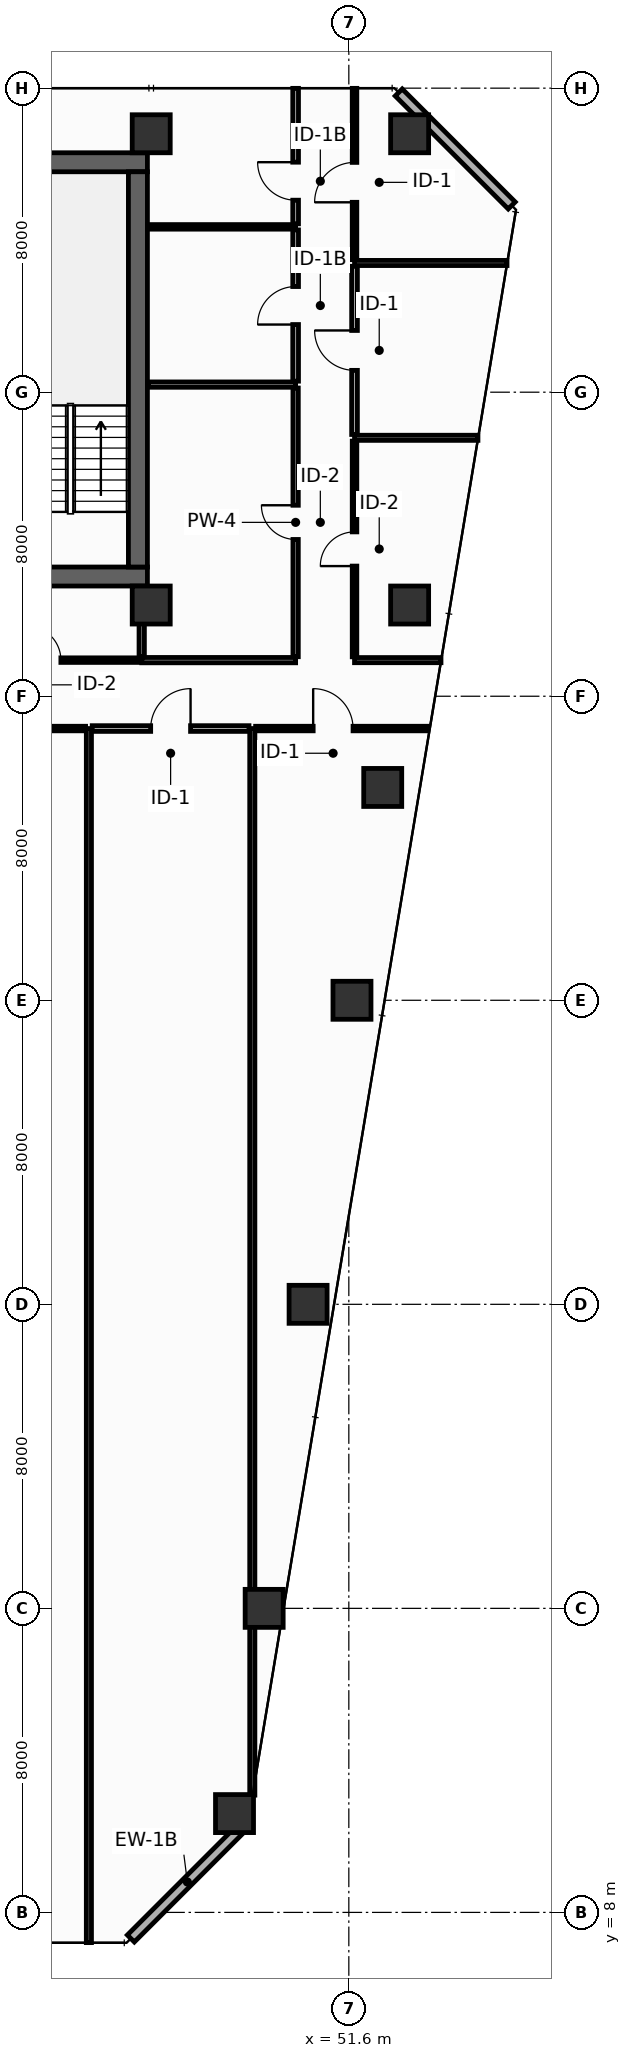
"""IFC4 building model, lengths in metres.
Left out: names, types, materials, properties, quantities, classifications, styles, units other than length and angle.
Written with IfcOpenShell. Run it as: python <this file> out.ifc"""

import sys

from ifc_helpers import new_model, si_unit, direction, frame, frame_2d, origin, origin_2d, place, context, subcontext, project, spatial, rectangle, hollow_rectangle, extrude, element, fill, save


model = new_model("IFC4")
c1 = context("Model", 3, precision=1e-05, world=origin(), true_north=direction((0.0, 1.0)))
c2 = subcontext(c1, "Body", "Model", "MODEL_VIEW")
j1 = project(units=[si_unit("LENGTHUNIT", "METRE"), si_unit("PLANEANGLEUNIT", "RADIAN")], contexts=[c1])
p1 = place(None, origin())
s1 = spatial("IfcSite", under=j1, at=p1, CompositionType="ELEMENT")
p2 = place(p1, origin())
s2 = spatial("IfcBuilding", under=s1, at=p2, CompositionType="ELEMENT")
p3 = place(p2, frame((0.0, 0.0, 141.0)))
s3 = spatial("IfcBuildingStorey", under=s2, at=p3, CompositionType="ELEMENT", Elevation=141.0)
p4 = place(p3, frame((13.6, 43.15, 0.0), z_axis=(0.0, 0.0, 1.0), x_axis=(1.0, 0.0, 0.0)))
e1 = element("IfcWall", 1, at=p4, inside=s3, PredefinedType="SHEAR", context=c2, shape_type="SweptSolid", body=[
    extrude(rectangle(XDim=32.7, YDim=0.5, at=frame_2d((16.35, 0.0))), origin(), (0.0, 0.0, 1.0), 3.55),
])
p5 = place(p4, frame((5.4, 0.0, 0.0)))
e2 = element("IfcOpeningElement", 2, at=p5, cuts=e1, PredefinedType="OPENING", context=c2, shape_type="SweptSolid", body=[
    extrude(rectangle(XDim=1.1, YDim=2.15, at=frame_2d((0.55, 1.075))), frame((0.0, 0.26, 0.0), z_axis=(0.0, -1.0, 0.0), x_axis=(1.0, 0.0, 0.0)), (0.0, 0.0, 1.0), 0.52),
])
p6 = place(p4, frame((25.6, 0.0, 0.0)))
e3 = element("IfcOpeningElement", 3, at=p6, cuts=e1, PredefinedType="OPENING", context=c2, shape_type="SweptSolid", body=[
    extrude(rectangle(XDim=1.1, YDim=2.15, at=frame_2d((0.55, 1.075))), frame((0.0, 0.26, 0.0), z_axis=(0.0, -1.0, 0.0), x_axis=(1.0, 0.0, 0.0)), (0.0, 0.0, 1.0), 0.52),
])
p7 = place(p3, frame((13.6, 54.05, 0.0), z_axis=(0.0, 0.0, 1.0), x_axis=(1.0, 0.0, 0.0)))
e4 = element("IfcWall", 4, at=p7, inside=s3, PredefinedType="SHEAR", context=c2, shape_type="SweptSolid", body=[
    extrude(rectangle(XDim=32.7, YDim=0.5, at=frame_2d((16.35, 0.0))), origin(), (0.0, 0.0, 1.0), 3.55),
])
p8 = place(p3, frame((46.05, 43.4, 0.0), z_axis=(0.0, 0.0, 1.0), x_axis=(0.0, 1.0, 0.0)))
e5 = element("IfcWall", 5, at=p8, inside=s3, PredefinedType="SHEAR", context=c2, shape_type="SweptSolid", body=[
    extrude(rectangle(XDim=10.4, YDim=0.5, at=frame_2d((5.2, 0.0))), origin(), (0.0, 0.0, 1.0), 3.55),
])
for number, where, z_axis, x_axis in (
    (6, (46.4, 54.8, 0.0), (0.0, 0.0, 1.0), (1.0, 0.0, 0.0)),
    (7, (53.2, 54.8, 0.0), (0.0, 0.0, 1.0), (1.0, 0.0, 0.0)),
    (8, (46.4, 42.4, 0.0), (0.0, 0.0, 1.0), (1.0, 0.0, 0.0)),
    (9, (53.2, 42.4, 0.0), (0.0, 0.0, 1.0), (1.0, 0.0, 0.0)),
    (10, (48.592, 10.6, 0.0), (0.0, 0.0, 1.0), (1.0, 0.0, 0.0)),
    (11, (49.372, 16.0, 0.0), (0.0, 0.0, 1.0), (1.0, 0.0, 0.0)),
    (12, (50.528, 24.0, 0.0), (0.0, 0.0, 1.0), (1.0, 0.0, 0.0)),
    (13, (51.683, 32.0, 0.0), (0.0, 0.0, 1.0), (1.0, 0.0, 0.0)),
    (14, (52.492, 37.6, 0.0), (0.0, 0.0, 1.0), (1.0, 0.0, 0.0)),
):
    element("IfcColumn", number, at=place(p3, frame(where, z_axis=z_axis, x_axis=x_axis)), inside=s3, PredefinedType="COLUMN", context=c2, shape_type="SweptSolid", body=[
        extrude(hollow_rectangle(XDim=1.0, YDim=1.0, WallThickness=0.045, at=origin_2d()), origin(), (0.0, 0.0, 1.0), 3.8),
    ])
p9 = place(p3, frame((45.864, 7.313, 0.0), z_axis=(0.0, 0.0, 1.0), x_axis=(0.70707775441, 0.707135806771, 0.0)))
e15 = element("IfcWall", 15, at=p9, inside=s3, PredefinedType="STANDARD", context=c2, shape_type="SweptSolid", body=[
    extrude(rectangle(XDim=4.206, YDim=0.26, at=frame_2d((2.103, 0.0))), origin(), (0.0, 0.0, 1.0), 3.55),
])
p10 = place(p3, frame((55.887, 52.913, 0.0), z_axis=(0.0, 0.0, 1.0), x_axis=(-0.707106781187, 0.707106781187, 0.0)))
e16 = element("IfcWall", 16, at=p10, inside=s3, PredefinedType="STANDARD", context=c2, shape_type="SweptSolid", body=[
    extrude(rectangle(XDim=4.206, YDim=0.26, at=frame_2d((2.103, 0.0))), origin(), (0.0, 0.0, 1.0), 3.55),
])
p11 = place(p3, frame((46.15, 40.95, 0.0), z_axis=(0.0, 0.0, 1.0), x_axis=(1.0, 0.0, 0.0)))
e17 = element("IfcWall", 17, at=p11, inside=s3, PredefinedType="PARTITIONING", context=c2, shape_type="SweptSolid", body=[
    extrude(rectangle(XDim=4.05, YDim=0.14, at=frame_2d((2.025, 0.0))), origin(), (0.0, 0.0, 1.0), 3.55),
])
p12 = place(p3, frame((46.15, 41.04, 0.0), z_axis=(0.0, 0.0, 1.0), x_axis=(0.0, 1.0, 0.0)))
e18 = element("IfcWall", 18, at=p12, inside=s3, PredefinedType="PARTITIONING", context=c2, shape_type="SweptSolid", body=[
    extrude(rectangle(XDim=1.84, YDim=0.14, at=frame_2d((0.92, 0.0))), origin(), (0.0, 0.0, 1.0), 3.55),
])
p13 = place(p3, frame((46.32, 48.2, 0.0), z_axis=(0.0, 0.0, 1.0), x_axis=(1.0, 0.0, 0.0)))
e19 = element("IfcWall", 19, at=p13, inside=s3, PredefinedType="PARTITIONING", context=c2, shape_type="SweptSolid", body=[
    extrude(rectangle(XDim=3.88, YDim=0.14, at=frame_2d((1.94, 0.0))), origin(), (0.0, 0.0, 1.0), 3.55),
])
p14 = place(p3, frame((50.2, 41.04, 0.0), z_axis=(0.0, 0.0, 1.0), x_axis=(0.0, 1.0, 0.0)))
e20 = element("IfcWall", 20, at=p14, inside=s3, PredefinedType="PARTITIONING", context=c2, shape_type="SweptSolid", body=[
    extrude(rectangle(XDim=7.07, YDim=0.14, at=frame_2d((3.535, 0.0))), origin(), (0.0, 0.0, 1.0), 2.835),
])
p15 = place(p14, frame((3.085, 0.0, 0.0)))
e21 = element("IfcOpeningElement", 21, at=p15, cuts=e20, PredefinedType="OPENING", context=c2, shape_type="SweptSolid", body=[
    extrude(rectangle(XDim=0.9, YDim=2.1, at=frame_2d((0.45, 1.05))), frame((0.0, 0.08, 0.0), z_axis=(0.0, -1.0, 0.0), x_axis=(1.0, 0.0, 0.0)), (0.0, 0.0, 1.0), 0.16),
])
p16 = place(p3, frame((46.32, 52.35, 0.0), z_axis=(0.0, 0.0, 1.0), x_axis=(1.0, 0.0, 0.0)))
e22 = element("IfcWall", 22, at=p16, inside=s3, PredefinedType="PARTITIONING", context=c2, shape_type="SweptSolid", body=[
    extrude(rectangle(XDim=3.88, YDim=0.12, at=frame_2d((1.94, 0.0))), origin(), (0.0, 0.0, 1.0), 3.55),
])
p17 = place(p3, frame((50.2, 48.29, 0.0), z_axis=(0.0, 0.0, 1.0), x_axis=(0.0, 1.0, 0.0)))
e23 = element("IfcWall", 23, at=p17, inside=s3, PredefinedType="PARTITIONING", context=c2, shape_type="SweptSolid", body=[
    extrude(rectangle(XDim=3.98, YDim=0.15, at=frame_2d((1.99, 0.0))), origin(), (0.0, 0.0, 1.0), 3.55),
])
p18 = place(p17, frame((1.49, 0.0, 0.0)))
e24 = element("IfcOpeningElement", 24, at=p18, cuts=e23, PredefinedType="OPENING", context=c2, shape_type="SweptSolid", body=[
    extrude(rectangle(XDim=1.0, YDim=2.15, at=frame_2d((0.5, 1.075))), frame((0.0, 0.085, 0.0), z_axis=(0.0, -1.0, 0.0), x_axis=(1.0, 0.0, 0.0)), (0.0, 0.0, 1.0), 0.17),
])
p19 = place(p3, frame((50.2, 52.43, 0.0), z_axis=(0.0, 0.0, 1.0), x_axis=(0.0, 1.0, 0.0)))
e25 = element("IfcWall", 25, at=p19, inside=s3, PredefinedType="PARTITIONING", context=c2, shape_type="SweptSolid", body=[
    extrude(rectangle(XDim=3.565, YDim=0.15, at=frame_2d((1.783, 0.0))), origin(), (0.0, 0.0, 1.0), 2.935),
])
p20 = place(p19, frame((0.622, 0.0, 0.0)))
e26 = element("IfcOpeningElement", 26, at=p20, cuts=e25, PredefinedType="OPENING", context=c2, shape_type="SweptSolid", body=[
    extrude(rectangle(XDim=1.0, YDim=2.15, at=frame_2d((0.5, 1.075))), frame((0.0, 0.085, 0.0), z_axis=(0.0, -1.0, 0.0), x_axis=(1.0, 0.0, 0.0)), (0.0, 0.0, 1.0), 0.17),
])
p21 = place(p3, frame((51.75, 40.95, 0.0), z_axis=(0.0, 0.0, 1.0), x_axis=(1.0, 0.0, 0.0)))
e27 = element("IfcWall", 27, at=p21, inside=s3, PredefinedType="PARTITIONING", context=c2, shape_type="SweptSolid", body=[
    extrude(rectangle(XDim=2.275, YDim=0.135, at=frame_2d((1.137, 0.0))), origin(), (0.0, 0.0, 1.0), 3.035),
])
p22 = place(p3, frame((51.75, 46.8, 0.0), z_axis=(0.0, 0.0, 1.0), x_axis=(1.0, 0.0, 0.0)))
e28 = element("IfcWall", 28, at=p22, inside=s3, PredefinedType="PARTITIONING", context=c2, shape_type="SweptSolid", body=[
    extrude(rectangle(XDim=3.247, YDim=0.135, at=frame_2d((1.624, 0.0))), origin(), (0.0, 0.0, 1.0), 2.835),
])
p23 = place(p3, frame((51.75, 51.4, 0.0), z_axis=(0.0, 0.0, 1.0), x_axis=(1.0, 0.0, 0.0)))
e29 = element("IfcWall", 29, at=p23, inside=s3, PredefinedType="PARTITIONING", context=c2, shape_type="SweptSolid", body=[
    extrude(rectangle(XDim=4.012, YDim=0.135, at=frame_2d((2.006, 0.0))), origin(), (0.0, 0.0, 1.0), 2.835),
])
p24 = place(p3, frame((51.75, 41.038, 0.0), z_axis=(0.0, 0.0, 1.0), x_axis=(0.0, 1.0, 0.0)))
e30 = element("IfcWall", 30, at=p24, inside=s3, PredefinedType="PARTITIONING", context=c2, shape_type="SweptSolid", body=[
    extrude(rectangle(XDim=5.675, YDim=0.12, at=frame_2d((2.837, 0.0))), origin(), (0.0, 0.0, 1.0), 2.835),
])
p25 = place(p24, frame((2.387, 0.0, 0.0)))
e31 = element("IfcOpeningElement", 31, at=p25, cuts=e30, PredefinedType="OPENING", context=c2, shape_type="SweptSolid", body=[
    extrude(rectangle(XDim=0.9, YDim=2.1, at=frame_2d((0.45, 1.05))), frame((0.0, 0.07, 0.0), z_axis=(0.0, -1.0, 0.0), x_axis=(1.0, 0.0, 0.0)), (0.0, 0.0, 1.0), 0.14),
])
p26 = place(p3, frame((51.75, 46.887, 0.0), z_axis=(0.0, 0.0, 1.0), x_axis=(0.0, 1.0, 0.0)))
e32 = element("IfcWall", 32, at=p26, inside=s3, PredefinedType="PARTITIONING", context=c2, shape_type="SweptSolid", body=[
    extrude(rectangle(XDim=4.425, YDim=0.15, at=frame_2d((2.212, 0.0))), origin(), (0.0, 0.0, 1.0), 3.55),
])
p27 = place(p26, frame((1.687, 0.0, 0.0)))
e33 = element("IfcOpeningElement", 33, at=p27, cuts=e32, PredefinedType="OPENING", context=c2, shape_type="SweptSolid", body=[
    extrude(rectangle(XDim=1.05, YDim=2.15, at=frame_2d((0.525, 1.075))), frame((0.0, 0.085, 0.0), z_axis=(0.0, -1.0, 0.0), x_axis=(1.0, 0.0, 0.0)), (0.0, 0.0, 1.0), 0.17),
])
p28 = place(p3, frame((51.75, 51.488, 0.0), z_axis=(0.0, 0.0, 1.0), x_axis=(0.0, 1.0, 0.0)))
e34 = element("IfcWall", 34, at=p28, inside=s3, PredefinedType="PARTITIONING", context=c2, shape_type="SweptSolid", body=[
    extrude(rectangle(XDim=4.508, YDim=0.12, at=frame_2d((2.254, 0.0))), origin(), (0.0, 0.0, 1.0), 2.935),
])
p29 = place(p28, frame((1.509, 0.0, 0.0)))
e35 = element("IfcOpeningElement", 35, at=p29, cuts=e34, PredefinedType="OPENING", context=c2, shape_type="SweptSolid", body=[
    extrude(rectangle(XDim=1.05, YDim=2.15, at=frame_2d((0.525, 1.075))), frame((0.0, 0.07, 0.0), z_axis=(0.0, -1.0, 0.0), x_axis=(1.0, 0.0, 0.0)), (0.0, 0.0, 1.0), 0.14),
])
p30 = place(p3, frame((40.995, 40.95, 0.0), z_axis=(0.0, 0.0, 1.0), x_axis=(1.0, 0.0, 0.0)))
e36 = element("IfcWall", 36, at=p30, inside=s3, PredefinedType="PARTITIONING", context=c2, shape_type="SweptSolid", body=[
    extrude(rectangle(XDim=5.155, YDim=0.12, at=frame_2d((2.577, 0.0))), origin(), (0.0, 0.0, 1.0), 3.55),
])
p31 = place(p30, frame((2.128, 0.0, 0.0)))
e37 = element("IfcOpeningElement", 37, at=p31, cuts=e36, PredefinedType="OPENING", context=c2, shape_type="SweptSolid", body=[
    extrude(rectangle(XDim=0.9, YDim=2.1, at=frame_2d((0.45, 1.05))), frame((0.0, 0.07, 0.0), z_axis=(0.0, -1.0, 0.0), x_axis=(1.0, 0.0, 0.0)), (0.0, 0.0, 1.0), 0.14),
])
p32 = place(p3, frame((44.76, 7.205, 0.0), z_axis=(0.0, 0.0, 1.0), x_axis=(0.0, 1.0, 0.0)))
e38 = element("IfcWall", 38, at=p32, inside=s3, PredefinedType="PARTITIONING", context=c2, shape_type="SweptSolid", body=[
    extrude(rectangle(XDim=31.945, YDim=0.135, at=frame_2d((15.972, 0.0))), origin(), (0.0, 0.0, 1.0), 2.835),
])
p33 = place(p3, frame((49.06, 11.085, 0.0), z_axis=(0.0, 0.0, 1.0), x_axis=(0.0, 1.0, 0.0)))
e39 = element("IfcWall", 39, at=p33, inside=s3, PredefinedType="PARTITIONING", context=c2, shape_type="SweptSolid", body=[
    extrude(rectangle(XDim=28.064, YDim=0.135, at=frame_2d((14.032, 0.0))), origin(), (0.0, 0.0, 1.0), 2.835),
])
p34 = place(p3, frame((40.538, 39.15, 0.0), z_axis=(0.0, 0.0, 1.0), x_axis=(1.0, 0.0, 0.0)))
e40 = element("IfcWall", 40, at=p34, inside=s3, PredefinedType="PARTITIONING", context=c2, shape_type="SweptSolid", body=[
    extrude(rectangle(XDim=4.135, YDim=0.12, at=frame_2d((2.067, 0.0))), origin(), (0.0, 0.0, 1.0), 3.55),
])
p35 = place(p34, frame((1.617, 0.0, 0.0)))
e41 = element("IfcOpeningElement", 41, at=p35, cuts=e40, PredefinedType="OPENING", context=c2, shape_type="SweptSolid", body=[
    extrude(rectangle(XDim=0.9, YDim=2.1, at=frame_2d((0.45, 1.05))), frame((0.0, 0.07, 0.0), z_axis=(0.0, -1.0, 0.0), x_axis=(1.0, 0.0, 0.0)), (0.0, 0.0, 1.0), 0.14),
])
p36 = place(p3, frame((44.847, 39.15, 0.0), z_axis=(0.0, 0.0, 1.0), x_axis=(1.0, 0.0, 0.0)))
e42 = element("IfcWall", 42, at=p36, inside=s3, PredefinedType="PARTITIONING", context=c2, shape_type="SweptSolid", body=[
    extrude(rectangle(XDim=4.125, YDim=0.15, at=frame_2d((2.062, 0.0))), origin(), (0.0, 0.0, 1.0), 3.55),
])
p37 = place(p36, frame((1.538, 0.0, 0.0)))
e43 = element("IfcOpeningElement", 43, at=p37, cuts=e42, PredefinedType="OPENING", context=c2, shape_type="SweptSolid", body=[
    extrude(rectangle(XDim=1.05, YDim=2.15, at=frame_2d((0.525, 1.075))), frame((0.0, 0.085, 0.0), z_axis=(0.0, -1.0, 0.0), x_axis=(1.0, 0.0, 0.0)), (0.0, 0.0, 1.0), 0.17),
])
p38 = place(p3, frame((49.147, 39.15, 0.0), z_axis=(0.0, 0.0, 1.0), x_axis=(1.0, 0.0, 0.0)))
e44 = element("IfcWall", 44, at=p38, inside=s3, PredefinedType="PARTITIONING", context=c2, shape_type="SweptSolid", body=[
    extrude(rectangle(XDim=4.519, YDim=0.12, at=frame_2d((2.259, 0.0))), origin(), (0.0, 0.0, 1.0), 3.035),
])
p39 = place(p38, frame((1.514, 0.0, 0.0)))
e45 = element("IfcOpeningElement", 45, at=p39, cuts=e44, PredefinedType="OPENING", context=c2, shape_type="SweptSolid", body=[
    extrude(rectangle(XDim=1.05, YDim=2.15, at=frame_2d((0.525, 1.075))), frame((0.0, 0.07, 0.0), z_axis=(0.0, -1.0, 0.0), x_axis=(1.0, 0.0, 0.0)), (0.0, 0.0, 1.0), 0.14),
])
p40 = place(p15, origin())
e46 = element("IfcDoor", 46, at=p40, inside=s3, OperationType="SINGLE_SWING_RIGHT", PredefinedType="DOOR", context=c2, shape_type="SweptSolid", body=[
    extrude(rectangle(XDim=0.9, YDim=2.1, at=frame_2d((0.45, 1.05))), frame((0.0, 0.025, 0.0), z_axis=(0.0, -1.0, 0.0), x_axis=(1.0, 0.0, 0.0)), (0.0, 0.0, 1.0), 0.05),
])
fill(e21, e46)
p41 = place(p18, origin())
e47 = element("IfcDoor", 47, at=p41, inside=s3, OperationType="SINGLE_SWING_LEFT", PredefinedType="DOOR", context=c2, shape_type="SweptSolid", body=[
    extrude(rectangle(XDim=1.0, YDim=2.15, at=frame_2d((0.5, 1.075))), frame((0.0, 0.025, 0.0), z_axis=(0.0, -1.0, 0.0), x_axis=(1.0, 0.0, 0.0)), (0.0, 0.0, 1.0), 0.05),
])
fill(e24, e47)
p42 = place(p20, origin())
e48 = element("IfcDoor", 48, at=p42, inside=s3, OperationType="SINGLE_SWING_RIGHT", PredefinedType="DOOR", context=c2, shape_type="SweptSolid", body=[
    extrude(rectangle(XDim=1.0, YDim=2.15, at=frame_2d((0.5, 1.075))), frame((0.0, 0.025, 0.0), z_axis=(0.0, -1.0, 0.0), x_axis=(1.0, 0.0, 0.0)), (0.0, 0.0, 1.0), 0.05),
])
fill(e26, e48)
p43 = place(p25, origin())
e49 = element("IfcDoor", 49, at=p43, inside=s3, OperationType="SINGLE_SWING_LEFT", PredefinedType="DOOR", context=c2, shape_type="SweptSolid", body=[
    extrude(rectangle(XDim=0.9, YDim=2.1, at=frame_2d((0.45, 1.05))), frame((0.0, 0.025, 0.0), z_axis=(0.0, -1.0, 0.0), x_axis=(1.0, 0.0, 0.0)), (0.0, 0.0, 1.0), 0.05),
])
fill(e31, e49)
p44 = place(p27, origin())
e50 = element("IfcDoor", 50, at=p44, inside=s3, OperationType="SINGLE_SWING_RIGHT", PredefinedType="DOOR", context=c2, shape_type="SweptSolid", body=[
    extrude(rectangle(XDim=1.05, YDim=2.15, at=frame_2d((0.525, 1.075))), frame((0.0, 0.025, 0.0), z_axis=(0.0, -1.0, 0.0), x_axis=(1.0, 0.0, 0.0)), (0.0, 0.0, 1.0), 0.05),
])
fill(e33, e50)
p45 = place(p29, origin())
e51 = element("IfcDoor", 51, at=p45, inside=s3, OperationType="SINGLE_SWING_LEFT", PredefinedType="DOOR", context=c2, shape_type="SweptSolid", body=[
    extrude(rectangle(XDim=1.05, YDim=2.15, at=frame_2d((0.525, 1.075))), frame((0.0, 0.025, 0.0), z_axis=(0.0, -1.0, 0.0), x_axis=(1.0, 0.0, 0.0)), (0.0, 0.0, 1.0), 0.05),
])
fill(e35, e51)
p46 = place(p31, origin())
e52 = element("IfcDoor", 52, at=p46, inside=s3, OperationType="SINGLE_SWING_LEFT", PredefinedType="DOOR", context=c2, shape_type="SweptSolid", body=[
    extrude(rectangle(XDim=0.9, YDim=2.1, at=frame_2d((0.45, 1.05))), frame((0.0, 0.025, 0.0), z_axis=(0.0, -1.0, 0.0), x_axis=(1.0, 0.0, 0.0)), (0.0, 0.0, 1.0), 0.05),
])
fill(e37, e52)
p47 = place(p37, origin())
e53 = element("IfcDoor", 53, at=p47, inside=s3, OperationType="SINGLE_SWING_RIGHT", PredefinedType="DOOR", context=c2, shape_type="SweptSolid", body=[
    extrude(rectangle(XDim=1.05, YDim=2.15, at=frame_2d((0.525, 1.075))), frame((0.0, 0.025, 0.0), z_axis=(0.0, -1.0, 0.0), x_axis=(1.0, 0.0, 0.0)), (0.0, 0.0, 1.0), 0.05),
])
fill(e43, e53)
p48 = place(p39, origin())
e54 = element("IfcDoor", 54, at=p48, inside=s3, OperationType="SINGLE_SWING_LEFT", PredefinedType="DOOR", context=c2, shape_type="SweptSolid", body=[
    extrude(rectangle(XDim=1.05, YDim=2.15, at=frame_2d((0.525, 1.075))), frame((0.0, 0.025, 0.0), z_axis=(0.0, -1.0, 0.0), x_axis=(1.0, 0.0, 0.0)), (0.0, 0.0, 1.0), 0.05),
])
fill(e45, e54)
save(model, sys.argv[1])
